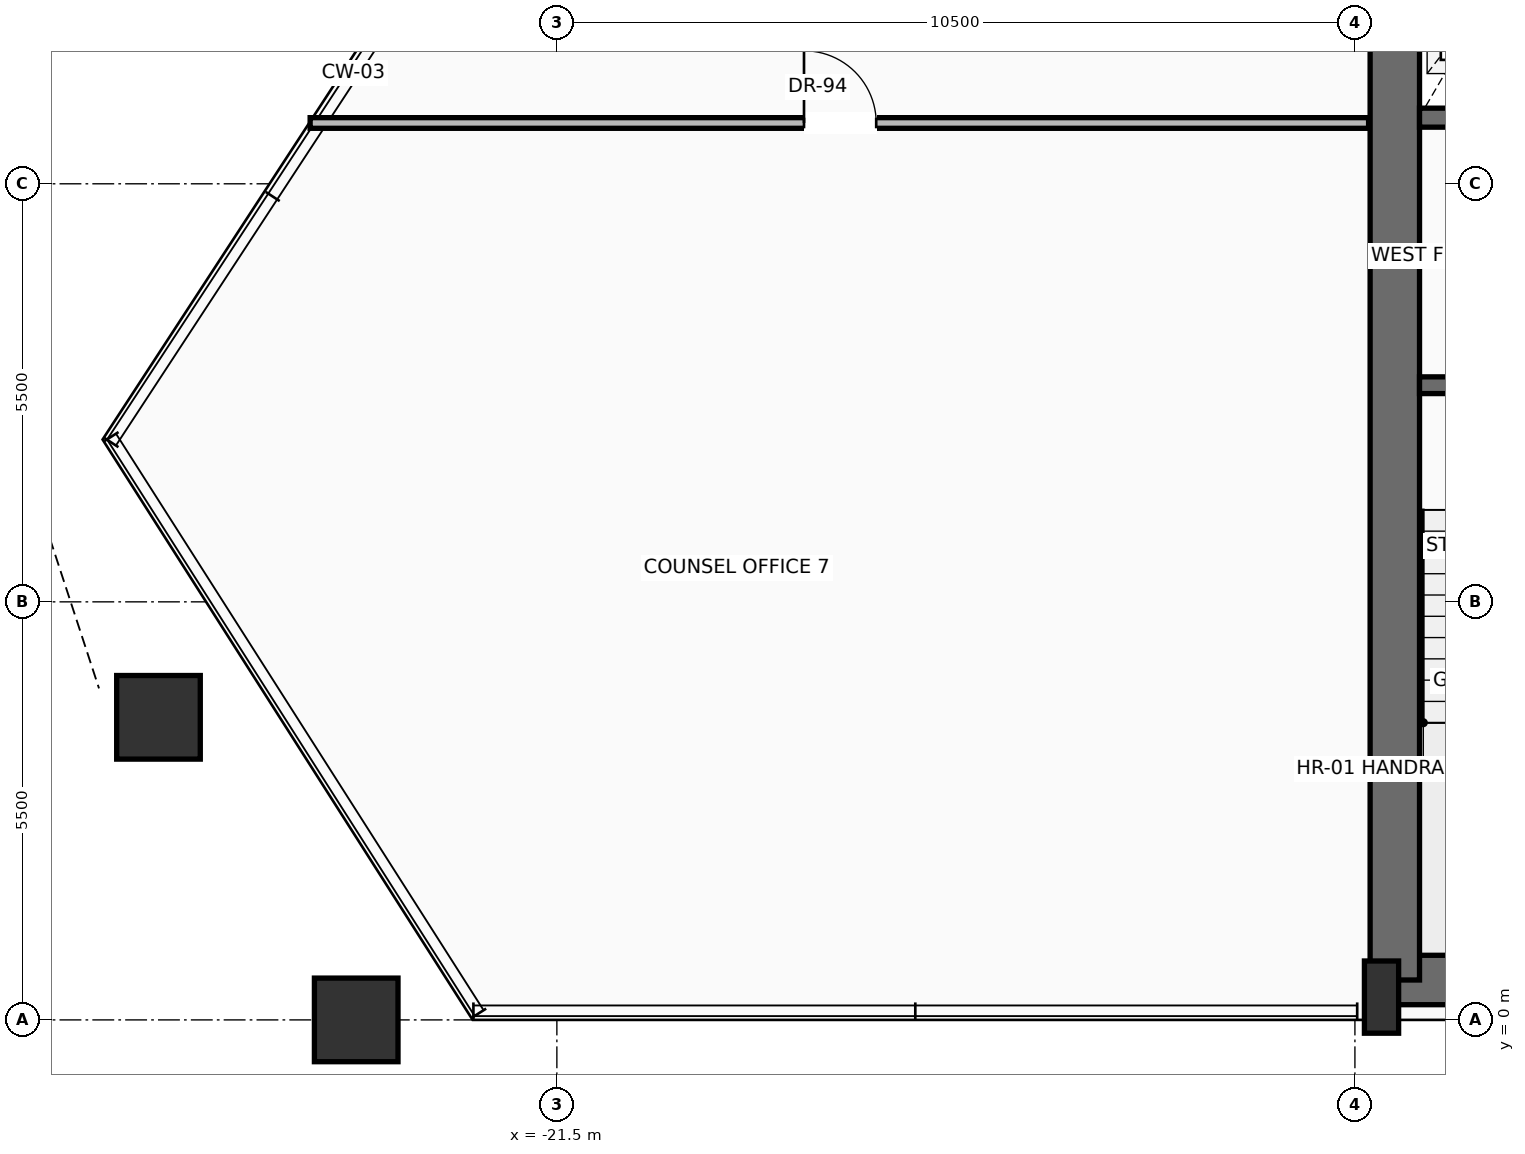
"""IFC4 building model, lengths in metres.
Left out: names, types, materials, properties, quantities, classifications, styles, units other than length and angle.
Written with IfcOpenShell. Run it as: python <this file> out.ifc"""

import sys

from ifc_helpers import new_model, si_unit, direction, frame, frame_2d, origin, origin_2d, place, context, subcontext, project, spatial, rectangle, hollow_rectangle, extrude, source, transform, mapped, element, fill, save


model = new_model("IFC4")
c1 = context("Model", 3, precision=1e-05, world=origin(), true_north=direction((0.0, 1.0)))
c2 = subcontext(c1, "Body", "Model", "MODEL_VIEW")
j1 = project(units=[si_unit("LENGTHUNIT", "METRE"), si_unit("PLANEANGLEUNIT", "RADIAN")], contexts=[c1])
p1 = place(None, origin())
s1 = spatial("IfcSite", under=j1, at=p1, CompositionType="ELEMENT")
p2 = place(p1, origin())
s2 = spatial("IfcBuilding", under=s1, at=p2, CompositionType="ELEMENT")
p3 = place(p2, frame((0.0, 0.0, 136.7)))
s3 = spatial("IfcBuildingStorey", under=s2, at=p3, CompositionType="ELEMENT", Elevation=136.7)
p4 = place(p3, frame((-10.65, 0.525, 0.0), z_axis=(0.0, 0.0, 1.0), x_axis=(1.0, 0.0, 0.0)))
e1 = element("IfcWall", 1, at=p4, inside=s3, PredefinedType="SHEAR", context=c2, shape_type="SweptSolid", body=[
    extrude(rectangle(XDim=21.3, YDim=0.65, at=frame_2d((10.65, 0.0))), origin(), (0.0, 0.0, 1.0), 3.47),
])
p5 = place(p3, frame((-10.475, 0.525, 0.0), z_axis=(0.0, 0.0, 1.0), x_axis=(0.0, 1.0, 0.0)))
e2 = element("IfcWall", 2, at=p5, inside=s3, PredefinedType="SHEAR", context=c2, shape_type="SweptSolid", body=[
    extrude(rectangle(XDim=15.55, YDim=0.65, at=frame_2d((7.775, 0.0))), origin(), (0.0, 0.0, 1.0), 3.47),
])
m1 = source(origin(), c2, "Body", "SweptSolid", [
    extrude(rectangle(XDim=0.45, YDim=0.95, at=origin_2d()), origin(), (0.0, 0.0, 1.0), 3.7),
])
p6 = place(p3, frame((-10.65, 0.3, 0.0), z_axis=(0.0, 0.0, 1.0), x_axis=(1.0, 0.0, 0.0)))
e3 = element("IfcColumn", 3, at=p6, inside=s3, PredefinedType="PILASTER", context=c2, shape_type="MappedRepresentation", body=[
    mapped(m1, transform((0.0, 0.0, 0.0), scale=1.0)),
])
m2 = source(origin(), c2, "Body", "SweptSolid", [
    extrude(hollow_rectangle(XDim=1.1, YDim=1.1, WallThickness=0.055, at=origin_2d()), origin(), (0.0, 0.0, 1.0), 3.691),
])
p7 = place(p3, frame((-24.14, 0.0, 0.004), z_axis=(-0.011111160078, 0.0, 0.999938269156), x_axis=(0.0, -1.0, 0.0)))
e4 = element("IfcColumn", 4, at=p7, inside=s3, PredefinedType="COLUMN", context=c2, shape_type="MappedRepresentation", body=[
    mapped(m2, transform((0.0, 0.0, 0.0), scale=1.0)),
])
m3 = source(origin(), c2, "Body", "SweptSolid", [
    extrude(hollow_rectangle(XDim=1.1, YDim=1.1, WallThickness=0.055, at=origin_2d()), origin(), (0.0, 0.0, 1.0), 3.692),
])
p8 = place(p3, frame((-26.742, 3.981, 0.004), z_axis=(-6.6133258e-05, -0.016202648187, 0.999868726293), x_axis=(0.999991670242, -0.004081598654, 0.0)))
e5 = element("IfcColumn", 5, at=p8, inside=s3, PredefinedType="COLUMN", context=c2, shape_type="MappedRepresentation", body=[
    mapped(m3, transform((0.0, 0.0, 0.0), scale=1.0)),
])
p9 = place(p3, frame((-5.5, 8.35, 0.0), z_axis=(0.0, 0.0, 1.0), x_axis=(-1.0, 0.0, 0.0)))
e6 = element("IfcWall", 6, at=p9, inside=s3, PredefinedType="SOLIDWALL", context=c2, shape_type="SweptSolid", body=[
    extrude(rectangle(XDim=4.65, YDim=0.22, at=frame_2d((2.325, 0.0))), origin(), (0.0, 0.0, 1.0), 3.47),
])
p10 = place(p9, frame((2.5, 0.0, 0.0)))
e7 = element("IfcOpeningElement", 7, at=p10, cuts=e6, PredefinedType="OPENING", context=c2, shape_type="SweptSolid", body=[
    extrude(rectangle(XDim=1.15, YDim=2.2, at=frame_2d((0.575, 1.1))), frame((0.0, 0.12, 0.0), z_axis=(0.0, -1.0, 0.0), x_axis=(1.0, 0.0, 0.0)), (0.0, 0.0, 1.0), 0.24),
])
p11 = place(p3, frame((-5.5, 11.87, 0.0), z_axis=(0.0, 0.0, 1.0), x_axis=(-1.0, 0.0, 0.0)))
e8 = element("IfcWall", 8, at=p11, inside=s3, PredefinedType="SOLIDWALL", context=c2, shape_type="SweptSolid", body=[
    extrude(rectangle(XDim=4.65, YDim=0.25, at=frame_2d((2.325, 0.0))), origin(), (0.0, 0.0, 1.0), 3.47),
])
p12 = place(p11, frame((2.95, 0.0, 0.0)))
e9 = element("IfcOpeningElement", 9, at=p12, cuts=e8, PredefinedType="OPENING", context=c2, shape_type="SweptSolid", body=[
    extrude(rectangle(XDim=1.2, YDim=2.25, at=frame_2d((0.6, 1.125))), frame((0.0, 0.135, 0.0), z_axis=(0.0, -1.0, 0.0), x_axis=(1.0, 0.0, 0.0)), (0.0, 0.0, 1.0), 0.27),
])
p13 = place(p3, frame((-24.746, 11.8, 0.0), z_axis=(0.0, 0.0, 1.0), x_axis=(1.0, 0.0, 0.0)))
e10 = element("IfcWall", 10, at=p13, inside=s3, PredefinedType="PARTITIONING", context=c2, shape_type="SweptSolid", body=[
    extrude(rectangle(XDim=13.926, YDim=0.14, at=frame_2d((6.963, 0.0))), origin(), (0.0, 0.0, 1.0), 3.462),
])
p14 = place(p13, frame((6.498, 0.0, 0.0)))
e11 = element("IfcOpeningElement", 11, at=p14, cuts=e10, PredefinedType="OPENING", context=c2, shape_type="SweptSolid", body=[
    extrude(rectangle(XDim=0.95, YDim=2.2, at=frame_2d((0.475, 1.1))), frame((0.0, 0.08, 0.0), z_axis=(0.0, -1.0, 0.0), x_axis=(1.0, 0.0, 0.0)), (0.0, 0.0, 1.0), 0.16),
])
m4 = source(origin(), c2, "Body", "SweptSolid", [
    extrude(rectangle(XDim=0.95, YDim=2.2, at=frame_2d((0.475, 1.1))), frame((0.0, 0.025, 0.0), z_axis=(0.0, -1.0, 0.0), x_axis=(1.0, 0.0, 0.0)), (0.0, 0.0, 1.0), 0.05),
])
p15 = place(p14, origin())
e12 = element("IfcDoor", 12, at=p15, inside=s3, OperationType="SINGLE_SWING_LEFT", PredefinedType="DOOR", context=c2, shape_type="MappedRepresentation", body=[
    mapped(m4, transform((0.0, 0.0, 0.0), scale=1.0)),
])
fill(e11, e12)
save(model, sys.argv[1])
